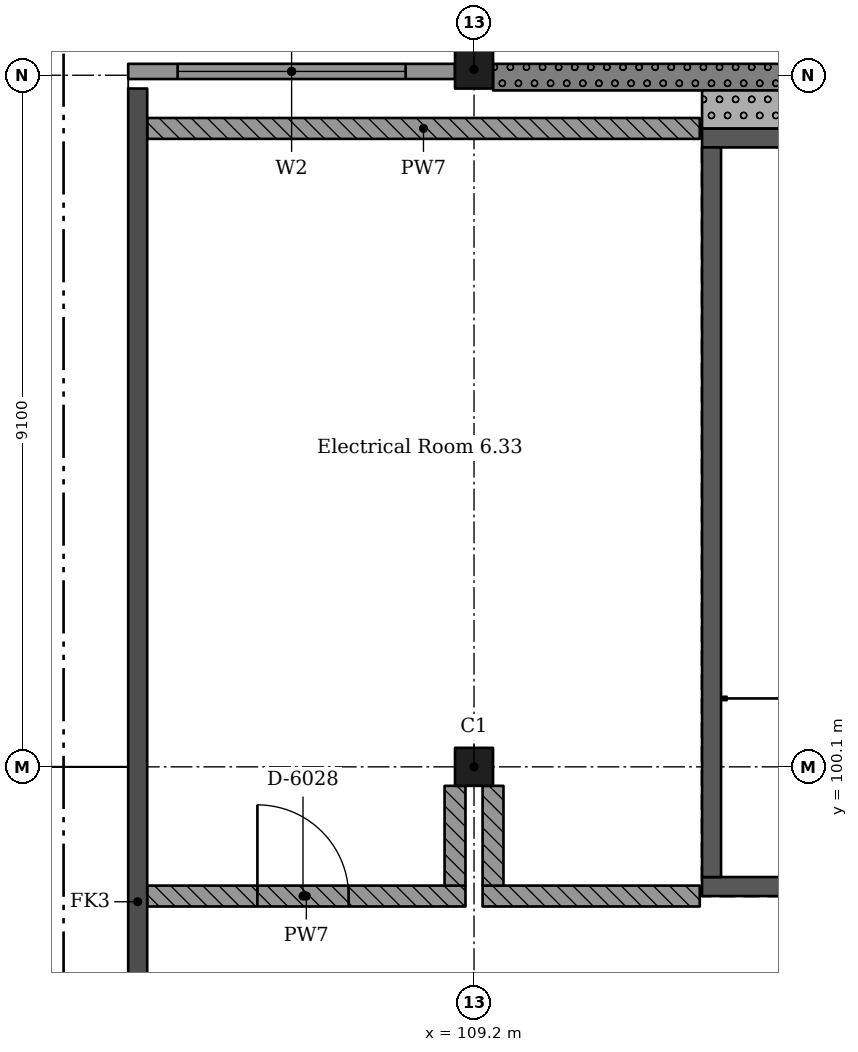
"""IFC4 building model, lengths in metres.
Left out: names, types, materials, properties, quantities, classifications, styles, units other than length and angle.
Written with IfcOpenShell. Run it as: python <this file> out.ifc"""

import sys

from ifc_helpers import new_model, si_unit, direction, frame, frame_2d, origin, origin_2d, place, context, subcontext, project, spatial, rectangle, extrude, element, fill, save


model = new_model("IFC4")
c1 = context("Model", 3, precision=1e-05, world=origin(), true_north=direction((0.0, 1.0)))
c2 = subcontext(c1, "Body", "Model", "MODEL_VIEW")
j1 = project(units=[si_unit("LENGTHUNIT", "METRE"), si_unit("PLANEANGLEUNIT", "RADIAN")], contexts=[c1])
p1 = place(None, origin())
s1 = spatial("IfcSite", under=j1, at=p1, CompositionType="ELEMENT")
p2 = place(p1, origin())
s2 = spatial("IfcBuilding", under=s1, at=p2, CompositionType="ELEMENT")
p3 = place(p2, frame((0.0, 0.0, 29.12)))
s3 = spatial("IfcBuildingStorey", under=s2, at=p3, CompositionType="ELEMENT", Elevation=29.12)
for number, where, z_axis, x_axis in (
    (1, (109.2, 100.1, 0.0), (0.0, 0.0, 1.0), (1.0, 0.0, 0.0)),
    (2, (109.2, 109.275, 0.0), (0.0, 0.0, 1.0), (1.0, 0.0, 0.0)),
):
    element("IfcColumn", number, at=place(p3, frame(where, z_axis=z_axis, x_axis=x_axis)), inside=s3, PredefinedType="COLUMN", context=c2, shape_type="SweptSolid", body=[
        extrude(rectangle(XDim=0.5, YDim=0.5, at=origin_2d()), origin(), (0.0, 0.0, 1.0), 4.55),
    ])
p4 = place(p3, frame((104.775, 68.25, 0.0), z_axis=(0.0, 0.0, 1.0), x_axis=(0.0, 1.0, 0.0)))
e3 = element("IfcWall", 3, at=p4, inside=s3, PredefinedType="SHEAR", context=c2, shape_type="SweptSolid", body=[
    extrude(rectangle(XDim=40.775, YDim=0.25, at=frame_2d((20.387, 0.0))), origin(), (0.0, 0.0, 1.0), 4.55),
])
p5 = place(p3, frame((117.6, 98.525, 0.0), z_axis=(0.0, 0.0, 1.0), x_axis=(-1.0, 0.0, 0.0)))
e4 = element("IfcWall", 4, at=p5, inside=s3, PredefinedType="SHEAR", context=c2, shape_type="SweptSolid", body=[
    extrude(rectangle(XDim=5.4, YDim=0.25, at=frame_2d((2.7, 0.0))), origin(), (0.0, 0.0, 1.0), 4.55),
])
p6 = place(p5, frame((1.5, 0.0, 0.0)))
e5 = element("IfcOpeningElement", 5, at=p6, cuts=e4, PredefinedType="OPENING", context=c2, shape_type="SweptSolid", body=[
    extrude(rectangle(XDim=2.4, YDim=2.1, at=frame_2d((1.2, 1.05))), frame((0.0, 0.135, 0.0), z_axis=(0.0, -1.0, 0.0), x_axis=(1.0, 0.0, 0.0)), (0.0, 0.0, 1.0), 0.27),
])
p7 = place(p3, frame((117.6, 108.375, 0.0), z_axis=(0.0, 0.0, 1.0), x_axis=(-1.0, 0.0, 0.0)))
e6 = element("IfcWall", 6, at=p7, inside=s3, PredefinedType="SHEAR", context=c2, shape_type="SweptSolid", body=[
    extrude(rectangle(XDim=5.4, YDim=0.25, at=frame_2d((2.7, 0.0))), origin(), (0.0, 0.0, 1.0), 4.55),
])
p8 = place(p3, frame((112.325, 108.25, 0.0), z_axis=(0.0, 0.0, 1.0), x_axis=(0.0, -1.0, 0.0)))
e7 = element("IfcWall", 7, at=p8, inside=s3, PredefinedType="SHEAR", context=c2, shape_type="SweptSolid", body=[
    extrude(rectangle(XDim=9.6, YDim=0.25, at=frame_2d((4.8, 0.0))), origin(), (0.0, 0.0, 1.0), 4.55),
])
p9 = place(p3, frame((118.05, 109.175, 0.0), z_axis=(0.0, 0.0, 1.0), x_axis=(-1.0, 0.0, 0.0)))
e8 = element("IfcWall", 8, at=p9, inside=s3, PredefinedType="SOLIDWALL", context=c2, shape_type="SweptSolid", body=[
    extrude(rectangle(XDim=8.6, YDim=0.35, at=frame_2d((4.3, 0.0))), origin(), (0.0, 0.0, 1.0), 4.5),
])
p10 = place(p3, frame((108.95, 109.25, 0.0), z_axis=(0.0, 0.0, 1.0), x_axis=(-1.0, 0.0, 0.0)))
e9 = element("IfcWall", 9, at=p10, inside=s3, PredefinedType="SOLIDWALL", context=c2, shape_type="SweptSolid", body=[
    extrude(rectangle(XDim=4.3, YDim=0.2, at=frame_2d((2.15, 0.0))), origin(), (0.0, 0.0, 1.0), 4.5),
])
p11 = place(p10, frame((0.65, 0.0, 0.6)))
e10 = element("IfcOpeningElement", 10, at=p11, cuts=e9, PredefinedType="OPENING", context=c2, shape_type="SweptSolid", body=[
    extrude(rectangle(XDim=3.0, YDim=3.0, at=frame_2d((1.5, 1.5))), frame((0.0, 0.11, 0.0), z_axis=(0.0, -1.0, 0.0), x_axis=(1.0, 0.0, 0.0)), (0.0, 0.0, 1.0), 0.22),
])
p12 = place(p3, frame((112.2, 108.75, 0.0), z_axis=(0.0, 0.0, 1.0), x_axis=(1.0, 0.0, 0.0)))
e11 = element("IfcWall", 11, at=p12, inside=s3, PredefinedType="SOLIDWALL", context=c2, shape_type="SweptSolid", body=[
    extrude(rectangle(XDim=5.4, YDim=0.5, at=frame_2d((2.7, 0.0))), origin(), (0.0, 0.0, 1.0), 3.88),
])
p13 = place(p3, frame((104.9, 98.4, 0.0), z_axis=(0.0, 0.0, 1.0), x_axis=(1.0, 0.0, 0.0)))
e12 = element("IfcWall", 12, at=p13, inside=s3, PredefinedType="SOLIDWALL", context=c2, shape_type="SweptSolid", body=[
    extrude(rectangle(XDim=4.188, YDim=0.275, at=frame_2d((2.094, 0.0))), origin(), (0.0, 0.0, 1.0), 3.88),
])
p14 = place(p13, frame((1.45, 0.0, 0.0)))
e13 = element("IfcOpeningElement", 13, at=p14, cuts=e12, PredefinedType="OPENING", context=c2, shape_type="SweptSolid", body=[
    extrude(rectangle(XDim=1.2, YDim=2.4, at=frame_2d((0.6, 1.2))), frame((0.0, 0.147, 0.0), z_axis=(0.0, -1.0, 0.0), x_axis=(1.0, 0.0, 0.0)), (0.0, 0.0, 1.0), 0.295),
])
p15 = place(p3, frame((104.9, 108.5, 0.0), z_axis=(0.0, 0.0, 1.0), x_axis=(1.0, 0.0, 0.0)))
e14 = element("IfcWall", 14, at=p15, inside=s3, PredefinedType="SOLIDWALL", context=c2, shape_type="SweptSolid", body=[
    extrude(rectangle(XDim=7.27, YDim=0.275, at=frame_2d((3.635, 0.0))), origin(), (0.0, 0.0, 1.0), 3.88),
])
p16 = place(p3, frame((108.95, 98.538, 0.0), z_axis=(0.0, 0.0, 1.0), x_axis=(0.0, 1.0, 0.0)))
e15 = element("IfcWall", 15, at=p16, inside=s3, PredefinedType="SOLIDWALL", context=c2, shape_type="SweptSolid", body=[
    extrude(rectangle(XDim=1.312, YDim=0.275, at=frame_2d((0.656, 0.0))), origin(), (0.0, 0.0, 1.0), 3.88),
])
p17 = place(p3, frame((109.312, 98.4, 0.0), z_axis=(0.0, 0.0, 1.0), x_axis=(1.0, 0.0, 0.0)))
e16 = element("IfcWall", 16, at=p17, inside=s3, PredefinedType="SOLIDWALL", context=c2, shape_type="SweptSolid", body=[
    extrude(rectangle(XDim=2.857, YDim=0.275, at=frame_2d((1.429, 0.0))), origin(), (0.0, 0.0, 1.0), 3.88),
])
p18 = place(p3, frame((109.45, 99.85, 0.0), z_axis=(0.0, 0.0, 1.0), x_axis=(0.0, -1.0, 0.0)))
e17 = element("IfcWall", 17, at=p18, inside=s3, PredefinedType="SOLIDWALL", context=c2, shape_type="SweptSolid", body=[
    extrude(rectangle(XDim=1.312, YDim=0.275, at=frame_2d((0.656, 0.0))), origin(), (0.0, 0.0, 1.0), 3.88),
])
p19 = place(p11, origin())
e18 = element("IfcWindow", 18, at=p19, inside=s3, PartitioningType="SINGLE_PANEL", PredefinedType="WINDOW", context=c2, shape_type="SweptSolid", body=[
    extrude(rectangle(XDim=3.0, YDim=3.0, at=frame_2d((1.5, 1.5))), frame((0.0, 0.03, 0.0), z_axis=(0.0, -1.0, 0.0), x_axis=(1.0, 0.0, 0.0)), (0.0, 0.0, 1.0), 0.06),
])
fill(e10, e18)
p20 = place(p14, origin())
e19 = element("IfcDoor", 19, at=p20, inside=s3, OperationType="SINGLE_SWING_RIGHT", PredefinedType="DOOR", context=c2, shape_type="SweptSolid", body=[
    extrude(rectangle(XDim=1.2, YDim=2.4, at=frame_2d((0.6, 1.2))), frame((0.0, 0.025, 0.0), z_axis=(0.0, -1.0, 0.0), x_axis=(1.0, 0.0, 0.0)), (0.0, 0.0, 1.0), 0.05),
])
fill(e13, e19)
save(model, sys.argv[1])
